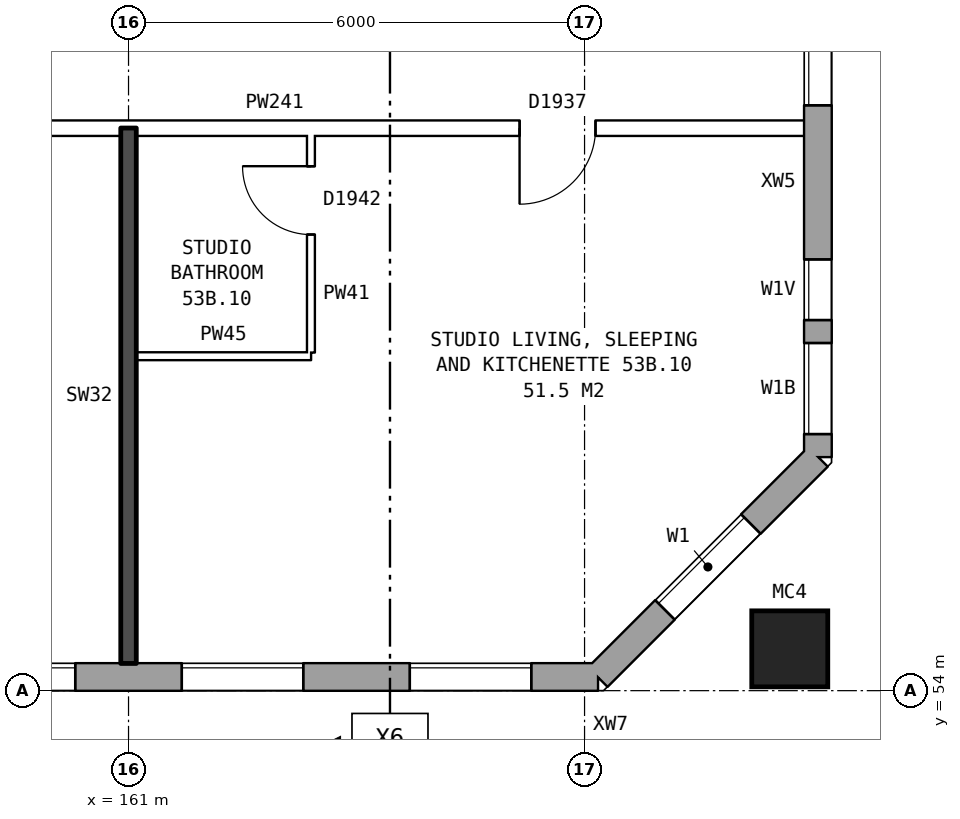
"""IFC4 building model, lengths in metres.
Left out: names, types, materials, properties, quantities, classifications, styles, units other than length and angle.
Written with IfcOpenShell. Run it as: python <this file> out.ifc"""

import sys

from ifc_helpers import new_model, si_unit, direction, frame, frame_2d, origin, origin_2d, place, context, subcontext, project, spatial, rectangle, hollow_rectangle, extrude, element, fill, save


model = new_model("IFC4")
c1 = context("Model", 3, precision=1e-05, world=origin(), true_north=direction((0.0, 1.0)))
c2 = subcontext(c1, "Body", "Model", "MODEL_VIEW")
j1 = project(units=[si_unit("LENGTHUNIT", "METRE"), si_unit("PLANEANGLEUNIT", "RADIAN")], contexts=[c1])
p1 = place(None, origin())
s1 = spatial("IfcSite", under=j1, at=p1, CompositionType="ELEMENT")
p2 = place(p1, origin())
s2 = spatial("IfcBuilding", under=s1, at=p2, CompositionType="ELEMENT")
p3 = place(p2, frame((0.0, 0.0, 188.2)))
s3 = spatial("IfcBuildingStorey", under=s2, at=p3, CompositionType="ELEMENT", Elevation=188.2)
p4 = place(p3, frame((169.7, 54.55, 0.0), z_axis=(0.0, 0.0, 1.0), x_axis=(1.0, 0.0, 0.0)))
e1 = element("IfcColumn", 1, at=p4, inside=s3, PredefinedType="COLUMN", context=c2, shape_type="SweptSolid", body=[
    extrude(hollow_rectangle(XDim=1.0, YDim=1.0, WallThickness=0.055, at=origin_2d()), origin(), (0.0, 0.0, 1.0), 3.1),
])
p5 = place(p3, frame((134.075, 54.18, 0.0), z_axis=(0.0, 0.0, 1.0), x_axis=(1.0, 0.0, 0.0)))
e2 = element("IfcWall", 2, at=p5, inside=s3, PredefinedType="STANDARD", context=c2, shape_type="SweptSolid", body=[
    extrude(rectangle(XDim=33.101, YDim=0.36, at=frame_2d((16.55, 0.0))), origin(), (0.0, 0.0, 1.0), 2.85),
])
p6 = place(p5, frame((0.625, 0.0, 0.8)))
e3 = element("IfcOpeningElement", 3, at=p6, cuts=e2, PredefinedType="OPENING", context=c2, shape_type="SweptSolid", body=[
    extrude(rectangle(XDim=1.6, YDim=1.8, at=frame_2d((0.8, 0.9))), frame((0.0, 0.19, 0.0), z_axis=(0.0, -1.0, 0.0), x_axis=(1.0, 0.0, 0.0)), (0.0, 0.0, 1.0), 0.38),
])
p7 = place(p5, frame((3.625, 0.0, 0.8)))
e4 = element("IfcOpeningElement", 4, at=p7, cuts=e2, PredefinedType="OPENING", context=c2, shape_type="SweptSolid", body=[
    extrude(rectangle(XDim=1.6, YDim=1.8, at=frame_2d((0.8, 0.9))), frame((0.0, 0.19, 0.0), z_axis=(0.0, -1.0, 0.0), x_axis=(1.0, 0.0, 0.0)), (0.0, 0.0, 1.0), 0.38),
])
p8 = place(p5, frame((6.625, 0.0, 0.8)))
e5 = element("IfcOpeningElement", 5, at=p8, cuts=e2, PredefinedType="OPENING", context=c2, shape_type="SweptSolid", body=[
    extrude(rectangle(XDim=1.6, YDim=1.8, at=frame_2d((0.8, 0.9))), frame((0.0, 0.19, 0.0), z_axis=(0.0, -1.0, 0.0), x_axis=(1.0, 0.0, 0.0)), (0.0, 0.0, 1.0), 0.38),
])
p9 = place(p5, frame((9.625, 0.0, 0.8)))
e6 = element("IfcOpeningElement", 6, at=p9, cuts=e2, PredefinedType="OPENING", context=c2, shape_type="SweptSolid", body=[
    extrude(rectangle(XDim=1.6, YDim=1.8, at=frame_2d((0.8, 0.9))), frame((0.0, 0.19, 0.0), z_axis=(0.0, -1.0, 0.0), x_axis=(1.0, 0.0, 0.0)), (0.0, 0.0, 1.0), 0.38),
])
p10 = place(p5, frame((12.975, 0.0, 0.15)))
e7 = element("IfcOpeningElement", 7, at=p10, cuts=e2, PredefinedType="OPENING", context=c2, shape_type="SweptSolid", body=[
    extrude(rectangle(XDim=0.6, YDim=0.9, at=frame_2d((0.3, 0.45))), frame((0.0, 0.19, 0.0), z_axis=(0.0, -1.0, 0.0), x_axis=(1.0, 0.0, 0.0)), (0.0, 0.0, 1.0), 0.38),
])
p11 = place(p5, frame((15.625, 0.0, 0.8)))
e8 = element("IfcOpeningElement", 8, at=p11, cuts=e2, PredefinedType="OPENING", context=c2, shape_type="SweptSolid", body=[
    extrude(rectangle(XDim=1.6, YDim=1.8, at=frame_2d((0.8, 0.9))), frame((0.0, 0.19, 0.0), z_axis=(0.0, -1.0, 0.0), x_axis=(1.0, 0.0, 0.0)), (0.0, 0.0, 1.0), 0.38),
])
p12 = place(p5, frame((18.075, 0.0, 0.45)))
e9 = element("IfcOpeningElement", 9, at=p12, cuts=e2, PredefinedType="OPENING", context=c2, shape_type="SweptSolid", body=[
    extrude(rectangle(XDim=1.0, YDim=1.8, at=frame_2d((0.5, 0.9))), frame((0.0, 0.19, 0.0), z_axis=(0.0, -1.0, 0.0), x_axis=(1.0, 0.0, 0.0)), (0.0, 0.0, 1.0), 0.38),
])
p13 = place(p5, frame((21.625, 0.0, 0.8)))
e10 = element("IfcOpeningElement", 10, at=p13, cuts=e2, PredefinedType="OPENING", context=c2, shape_type="SweptSolid", body=[
    extrude(rectangle(XDim=1.6, YDim=1.8, at=frame_2d((0.8, 0.9))), frame((0.0, 0.19, 0.0), z_axis=(0.0, -1.0, 0.0), x_axis=(1.0, 0.0, 0.0)), (0.0, 0.0, 1.0), 0.38),
])
p14 = place(p5, frame((24.625, 0.0, 0.8)))
e11 = element("IfcOpeningElement", 11, at=p14, cuts=e2, PredefinedType="OPENING", context=c2, shape_type="SweptSolid", body=[
    extrude(rectangle(XDim=1.6, YDim=1.8, at=frame_2d((0.8, 0.9))), frame((0.0, 0.19, 0.0), z_axis=(0.0, -1.0, 0.0), x_axis=(1.0, 0.0, 0.0)), (0.0, 0.0, 1.0), 0.38),
])
p15 = place(p5, frame((27.625, 0.0, 0.8)))
e12 = element("IfcOpeningElement", 12, at=p15, cuts=e2, PredefinedType="OPENING", context=c2, shape_type="SweptSolid", body=[
    extrude(rectangle(XDim=1.6, YDim=1.8, at=frame_2d((0.8, 0.9))), frame((0.0, 0.19, 0.0), z_axis=(0.0, -1.0, 0.0), x_axis=(1.0, 0.0, 0.0)), (0.0, 0.0, 1.0), 0.38),
])
p16 = place(p5, frame((30.625, 0.0, 0.8)))
e13 = element("IfcOpeningElement", 13, at=p16, cuts=e2, PredefinedType="OPENING", context=c2, shape_type="SweptSolid", body=[
    extrude(rectangle(XDim=1.6, YDim=1.8, at=frame_2d((0.8, 0.9))), frame((0.0, 0.19, 0.0), z_axis=(0.0, -1.0, 0.0), x_axis=(1.0, 0.0, 0.0)), (0.0, 0.0, 1.0), 0.38),
])
p17 = place(p5, frame((13.875, 0.0, 0.25)))
e14 = element("IfcOpeningElement", 14, at=p17, cuts=e2, PredefinedType="OPENING", context=c2, shape_type="SweptSolid", body=[
    extrude(rectangle(XDim=0.8, YDim=1.8, at=frame_2d((0.4, 0.9))), frame((0.0, 0.19, 0.0), z_axis=(0.0, -1.0, 0.0), x_axis=(1.0, 0.0, 0.0)), (0.0, 0.0, 1.0), 0.38),
])
p18 = place(p5, frame((19.375, 0.0, 0.35)))
e15 = element("IfcOpeningElement", 15, at=p18, cuts=e2, PredefinedType="OPENING", context=c2, shape_type="SweptSolid", body=[
    extrude(rectangle(XDim=0.6, YDim=0.9, at=frame_2d((0.3, 0.45))), frame((0.0, 0.19, 0.0), z_axis=(0.0, -1.0, 0.0), x_axis=(1.0, 0.0, 0.0)), (0.0, 0.0, 1.0), 0.38),
])
p19 = place(p3, frame((167.175, 54.18, 0.0), z_axis=(0.0, 0.0, 1.0), x_axis=(0.707106781187, 0.707106781187, 0.0)))
e16 = element("IfcWall", 16, at=p19, inside=s3, PredefinedType="STANDARD", context=c2, shape_type="SweptSolid", body=[
    extrude(rectangle(XDim=4.094, YDim=0.36, at=frame_2d((2.047, 0.0))), origin(), (0.0, 0.0, 1.0), 2.85),
])
p20 = place(p19, frame((1.247, 0.0, 0.8)))
e17 = element("IfcOpeningElement", 17, at=p20, cuts=e16, PredefinedType="OPENING", context=c2, shape_type="SweptSolid", body=[
    extrude(rectangle(XDim=1.6, YDim=1.8, at=frame_2d((0.8, 0.9))), frame((0.0, 0.19, 0.0), z_axis=(0.0, -1.0, 0.0), x_axis=(1.0, 0.0, 0.0)), (0.0, 0.0, 1.0), 0.38),
])
p21 = place(p3, frame((170.07, 57.075, 0.0), z_axis=(0.0, 0.0, 1.0), x_axis=(0.0, 1.0, 0.0)))
e18 = element("IfcWall", 18, at=p21, inside=s3, PredefinedType="STANDARD", context=c2, shape_type="SweptSolid", body=[
    extrude(rectangle(XDim=25.851, YDim=0.36, at=frame_2d((12.925, 0.0))), origin(), (0.0, 0.0, 1.0), 2.85),
])
p22 = place(p21, frame((0.3, 0.0, 0.8)))
e19 = element("IfcOpeningElement", 19, at=p22, cuts=e18, PredefinedType="OPENING", context=c2, shape_type="SweptSolid", body=[
    extrude(rectangle(XDim=1.2, YDim=1.8, at=frame_2d((0.6, 0.9))), frame((0.0, 0.19, 0.0), z_axis=(0.0, -1.0, 0.0), x_axis=(1.0, 0.0, 0.0)), (0.0, 0.0, 1.0), 0.38),
])
p23 = place(p21, frame((4.625, 0.0, 0.8)))
e20 = element("IfcOpeningElement", 20, at=p23, cuts=e18, PredefinedType="OPENING", context=c2, shape_type="SweptSolid", body=[
    extrude(rectangle(XDim=1.6, YDim=1.8, at=frame_2d((0.8, 0.9))), frame((0.0, 0.19, 0.0), z_axis=(0.0, -1.0, 0.0), x_axis=(1.0, 0.0, 0.0)), (0.0, 0.0, 1.0), 0.38),
])
p24 = place(p21, frame((7.625, 0.0, 0.8)))
e21 = element("IfcOpeningElement", 21, at=p24, cuts=e18, PredefinedType="OPENING", context=c2, shape_type="SweptSolid", body=[
    extrude(rectangle(XDim=1.6, YDim=1.8, at=frame_2d((0.8, 0.9))), frame((0.0, 0.19, 0.0), z_axis=(0.0, -1.0, 0.0), x_axis=(1.0, 0.0, 0.0)), (0.0, 0.0, 1.0), 0.38),
])
p25 = place(p21, frame((10.625, 0.0, 0.8)))
e22 = element("IfcOpeningElement", 22, at=p25, cuts=e18, PredefinedType="OPENING", context=c2, shape_type="SweptSolid", body=[
    extrude(rectangle(XDim=1.6, YDim=1.8, at=frame_2d((0.8, 0.9))), frame((0.0, 0.19, 0.0), z_axis=(0.0, -1.0, 0.0), x_axis=(1.0, 0.0, 0.0)), (0.0, 0.0, 1.0), 0.38),
])
p26 = place(p21, frame((13.625, 0.0, 0.8)))
e23 = element("IfcOpeningElement", 23, at=p26, cuts=e18, PredefinedType="OPENING", context=c2, shape_type="SweptSolid", body=[
    extrude(rectangle(XDim=1.6, YDim=1.8, at=frame_2d((0.8, 0.9))), frame((0.0, 0.19, 0.0), z_axis=(0.0, -1.0, 0.0), x_axis=(1.0, 0.0, 0.0)), (0.0, 0.0, 1.0), 0.38),
])
p27 = place(p21, frame((16.625, 0.0, 0.8)))
e24 = element("IfcOpeningElement", 24, at=p27, cuts=e18, PredefinedType="OPENING", context=c2, shape_type="SweptSolid", body=[
    extrude(rectangle(XDim=1.6, YDim=1.8, at=frame_2d((0.8, 0.9))), frame((0.0, 0.19, 0.0), z_axis=(0.0, -1.0, 0.0), x_axis=(1.0, 0.0, 0.0)), (0.0, 0.0, 1.0), 0.38),
])
p28 = place(p21, frame((19.625, 0.0, 0.8)))
e25 = element("IfcOpeningElement", 25, at=p28, cuts=e18, PredefinedType="OPENING", context=c2, shape_type="SweptSolid", body=[
    extrude(rectangle(XDim=1.6, YDim=1.8, at=frame_2d((0.8, 0.9))), frame((0.0, 0.19, 0.0), z_axis=(0.0, -1.0, 0.0), x_axis=(1.0, 0.0, 0.0)), (0.0, 0.0, 1.0), 0.38),
])
p29 = place(p21, frame((23.075, 0.0, 0.8)))
e26 = element("IfcOpeningElement", 26, at=p29, cuts=e18, PredefinedType="OPENING", context=c2, shape_type="SweptSolid", body=[
    extrude(rectangle(XDim=1.0, YDim=0.9, at=frame_2d((0.5, 0.45))), frame((0.0, 0.19, 0.0), z_axis=(0.0, -1.0, 0.0), x_axis=(1.0, 0.0, 0.0)), (0.0, 0.0, 1.0), 0.38),
])
p30 = place(p21, frame((1.8, 0.0, 0.8)))
e27 = element("IfcOpeningElement", 27, at=p30, cuts=e18, PredefinedType="OPENING", context=c2, shape_type="SweptSolid", body=[
    extrude(rectangle(XDim=0.8, YDim=0.9, at=frame_2d((0.4, 0.45))), frame((0.0, 0.19, 0.0), z_axis=(0.0, -1.0, 0.0), x_axis=(1.0, 0.0, 0.0)), (0.0, 0.0, 1.0), 0.38),
])
p31 = place(p21, frame((24.375, 0.0, 0.8)))
e28 = element("IfcOpeningElement", 28, at=p31, cuts=e18, PredefinedType="OPENING", context=c2, shape_type="SweptSolid", body=[
    extrude(rectangle(XDim=1.0, YDim=1.8, at=frame_2d((0.5, 0.9))), frame((0.0, 0.19, 0.0), z_axis=(0.0, -1.0, 0.0), x_axis=(1.0, 0.0, 0.0)), (0.0, 0.0, 1.0), 0.38),
])
p32 = place(p3, frame((161.1, 58.4, 0.0), z_axis=(0.0, 0.0, 1.0), x_axis=(1.0, 0.0, 0.0)))
e29 = element("IfcWall", 29, at=p32, inside=s3, PredefinedType="PARTITIONING", context=c2, shape_type="SweptSolid", body=[
    extrude(rectangle(XDim=2.3, YDim=0.1, at=frame_2d((1.15, 0.0))), origin(), (0.0, 0.0, 1.0), 2.85),
])
p33 = place(p3, frame((155.1, 61.4, 0.0), z_axis=(0.0, 0.0, 1.0), x_axis=(1.0, 0.0, 0.0)))
e30 = element("IfcWall", 30, at=p33, inside=s3, PredefinedType="PARTITIONING", context=c2, shape_type="SweptSolid", body=[
    extrude(rectangle(XDim=14.79, YDim=0.2, at=frame_2d((7.395, 0.0))), origin(), (0.0, 0.0, 1.0), 2.85),
])
p34 = place(p33, frame((3.6, 0.0, 0.0)))
e31 = element("IfcOpeningElement", 31, at=p34, cuts=e30, PredefinedType="OPENING", context=c2, shape_type="SweptSolid", body=[
    extrude(rectangle(XDim=1.0, YDim=2.1, at=frame_2d((0.5, 1.05))), frame((0.0, 0.11, 0.0), z_axis=(0.0, -1.0, 0.0), x_axis=(1.0, 0.0, 0.0)), (0.0, 0.0, 1.0), 0.22),
])
p35 = place(p33, frame((11.045, 0.0, 0.0)))
e32 = element("IfcOpeningElement", 32, at=p35, cuts=e30, PredefinedType="OPENING", context=c2, shape_type="SweptSolid", body=[
    extrude(rectangle(XDim=1.0, YDim=2.1, at=frame_2d((0.5, 1.05))), frame((0.0, 0.11, 0.0), z_axis=(0.0, -1.0, 0.0), x_axis=(1.0, 0.0, 0.0)), (0.0, 0.0, 1.0), 0.22),
])
p36 = place(p3, frame((161.0, 54.36, 0.0), z_axis=(0.0, 0.0, 1.0), x_axis=(0.0, 1.0, 0.0)))
e33 = element("IfcWall", 33, at=p36, inside=s3, PredefinedType="SOLIDWALL", context=c2, shape_type="SweptSolid", body=[
    extrude(rectangle(XDim=7.04, YDim=0.2, at=frame_2d((3.52, 0.0))), origin(), (0.0, 0.0, 1.0), 2.85),
])
p37 = place(p3, frame((163.4, 58.45, 0.0), z_axis=(0.0, 0.0, 1.0), x_axis=(0.0, 1.0, 0.0)))
e34 = element("IfcWall", 34, at=p37, inside=s3, PredefinedType="PARTITIONING", context=c2, shape_type="SweptSolid", body=[
    extrude(rectangle(XDim=2.85, YDim=0.1, at=frame_2d((1.425, 0.0))), origin(), (0.0, 0.0, 1.0), 2.85),
])
p38 = place(p37, frame((1.55, 0.0, 0.0)))
e35 = element("IfcOpeningElement", 35, at=p38, cuts=e34, PredefinedType="OPENING", context=c2, shape_type="SweptSolid", body=[
    extrude(rectangle(XDim=0.9, YDim=2.1, at=frame_2d((0.45, 1.05))), frame((0.0, 0.06, 0.0), z_axis=(0.0, -1.0, 0.0), x_axis=(1.0, 0.0, 0.0)), (0.0, 0.0, 1.0), 0.12),
])
p39 = place(p14, origin())
e36 = element("IfcWindow", 36, at=p39, inside=s3, PartitioningType="SINGLE_PANEL", PredefinedType="WINDOW", context=c2, shape_type="SweptSolid", body=[
    extrude(rectangle(XDim=1.6, YDim=1.8, at=frame_2d((0.8, 0.9))), frame((0.0, 0.15, 0.0), z_axis=(0.0, -1.0, 0.0), x_axis=(1.0, 0.0, 0.0)), (0.0, 0.0, 1.0), 0.06),
])
fill(e11, e36)
p40 = place(p15, origin())
e37 = element("IfcWindow", 37, at=p40, inside=s3, PartitioningType="SINGLE_PANEL", PredefinedType="WINDOW", context=c2, shape_type="SweptSolid", body=[
    extrude(rectangle(XDim=1.6, YDim=1.8, at=frame_2d((0.8, 0.9))), frame((0.0, 0.15, 0.0), z_axis=(0.0, -1.0, 0.0), x_axis=(1.0, 0.0, 0.0)), (0.0, 0.0, 1.0), 0.06),
])
fill(e12, e37)
p41 = place(p16, origin())
e38 = element("IfcWindow", 38, at=p41, inside=s3, PartitioningType="SINGLE_PANEL", PredefinedType="WINDOW", context=c2, shape_type="SweptSolid", body=[
    extrude(rectangle(XDim=1.6, YDim=1.8, at=frame_2d((0.8, 0.9))), frame((0.0, 0.15, 0.0), z_axis=(0.0, -1.0, 0.0), x_axis=(1.0, 0.0, 0.0)), (0.0, 0.0, 1.0), 0.06),
])
fill(e13, e38)
p42 = place(p20, origin())
e39 = element("IfcWindow", 39, at=p42, inside=s3, PartitioningType="SINGLE_PANEL", PredefinedType="WINDOW", context=c2, shape_type="SweptSolid", body=[
    extrude(rectangle(XDim=1.6, YDim=1.8, at=frame_2d((0.8, 0.9))), frame((0.0, 0.15, 0.0), z_axis=(0.0, -1.0, 0.0), x_axis=(1.0, 0.0, 0.0)), (0.0, 0.0, 1.0), 0.06),
])
fill(e17, e39)
p43 = place(p22, origin())
e40 = element("IfcWindow", 40, at=p43, inside=s3, PartitioningType="SINGLE_PANEL", PredefinedType="WINDOW", context=c2, shape_type="SweptSolid", body=[
    extrude(rectangle(XDim=1.2, YDim=1.8, at=frame_2d((0.6, 0.9))), frame((0.0, 0.15, 0.0), z_axis=(0.0, -1.0, 0.0), x_axis=(1.0, 0.0, 0.0)), (0.0, 0.0, 1.0), 0.06),
])
fill(e19, e40)
p44 = place(p23, origin())
e41 = element("IfcWindow", 41, at=p44, inside=s3, PartitioningType="SINGLE_PANEL", PredefinedType="WINDOW", context=c2, shape_type="SweptSolid", body=[
    extrude(rectangle(XDim=1.6, YDim=1.8, at=frame_2d((0.8, 0.9))), frame((0.0, 0.15, 0.0), z_axis=(0.0, -1.0, 0.0), x_axis=(1.0, 0.0, 0.0)), (0.0, 0.0, 1.0), 0.06),
])
fill(e20, e41)
p45 = place(p35, frame((1.0, 0.0, 0.0), z_axis=(0.0, 0.0, 1.0), x_axis=(-1.0, 0.0, 0.0)))
e42 = element("IfcDoor", 42, at=p45, inside=s3, OperationType="SINGLE_SWING_RIGHT", PredefinedType="DOOR", context=c2, shape_type="SweptSolid", body=[
    extrude(rectangle(XDim=1.0, YDim=2.1, at=frame_2d((0.5, 1.05))), frame((0.0, 0.025, 0.0), z_axis=(0.0, -1.0, 0.0), x_axis=(1.0, 0.0, 0.0)), (0.0, 0.0, 1.0), 0.05),
])
fill(e32, e42)
p46 = place(p38, origin())
e43 = element("IfcDoor", 43, at=p46, inside=s3, OperationType="SINGLE_SWING_RIGHT", PredefinedType="DOOR", context=c2, shape_type="SweptSolid", body=[
    extrude(rectangle(XDim=0.9, YDim=2.1, at=frame_2d((0.45, 1.05))), frame((0.0, 0.025, 0.0), z_axis=(0.0, -1.0, 0.0), x_axis=(1.0, 0.0, 0.0)), (0.0, 0.0, 1.0), 0.05),
])
fill(e35, e43)
p47 = place(p30, origin())
e44 = element("IfcWindow", 44, at=p47, inside=s3, PartitioningType="SINGLE_PANEL", PredefinedType="WINDOW", context=c2, shape_type="SweptSolid", body=[
    extrude(rectangle(XDim=0.8, YDim=0.9, at=frame_2d((0.4, 0.45))), frame((0.0, 0.15, 0.0), z_axis=(0.0, -1.0, 0.0), x_axis=(1.0, 0.0, 0.0)), (0.0, 0.0, 1.0), 0.06),
])
fill(e27, e44)
save(model, sys.argv[1])
